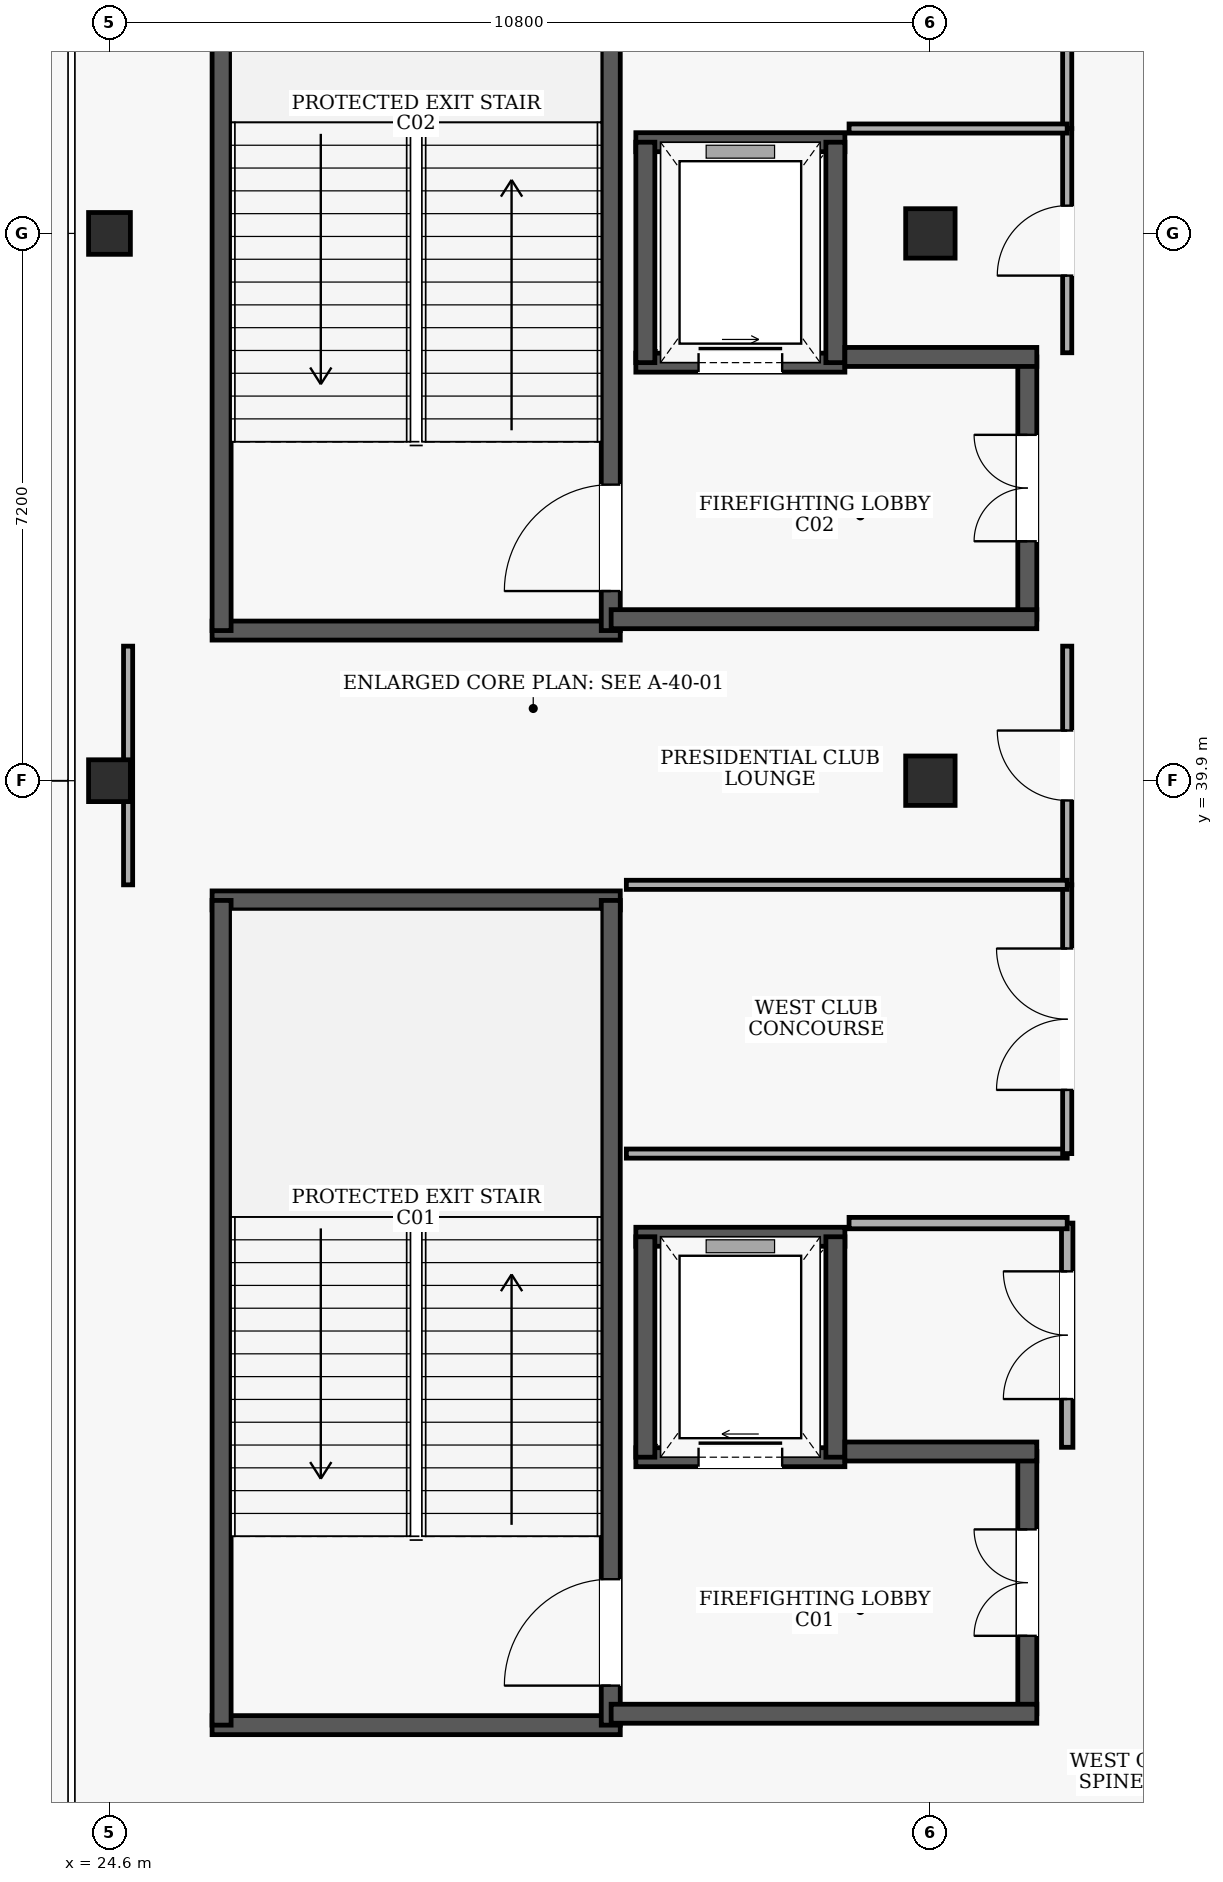
"""IFC4 building model, lengths in metres.
Left out: names, types, materials, properties, quantities, classifications, styles, units other than length and angle.
Written with IfcOpenShell. Run it as: python <this file> out.ifc"""

import sys

from ifc_helpers import new_model, si_unit, direction, frame, frame_2d, origin, origin_2d, place, context, subcontext, project, spatial, rectangle, extrude, element, fill, save


model = new_model("IFC4")
c1 = context("Model", 3, precision=1e-05, world=origin(), true_north=direction((0.0, 1.0)))
c2 = subcontext(c1, "Body", "Model", "MODEL_VIEW")
j1 = project(units=[si_unit("LENGTHUNIT", "METRE"), si_unit("PLANEANGLEUNIT", "RADIAN")], contexts=[c1])
p1 = place(None, origin())
s1 = spatial("IfcSite", under=j1, at=p1, CompositionType="ELEMENT")
p2 = place(p1, origin())
s2 = spatial("IfcBuilding", under=s1, at=p2, CompositionType="ELEMENT")
p3 = place(p2, frame((0.0, 0.0, 10.2)))
s3 = spatial("IfcBuildingStorey", under=s2, at=p3, CompositionType="ELEMENT", Elevation=10.2)
for number, where, z_axis, x_axis in (
    (1, (24.6, 39.9, 0.0), (0.0, 0.0, 1.0), (1.0, 0.0, 0.0)),
    (2, (24.6, 47.1, 0.0), (0.0, 0.0, 1.0), (1.0, 0.0, 0.0)),
):
    element("IfcColumn", number, at=place(p3, frame(where, z_axis=z_axis, x_axis=x_axis)), inside=s3, PredefinedType="COLUMN", context=c2, shape_type="SweptSolid", body=[
        extrude(rectangle(XDim=0.55, YDim=0.55, at=origin_2d()), origin(), (0.0, 0.0, 1.0), 4.8),
    ])
for number, where, z_axis, x_axis in (
    (3, (35.4, 39.9, 0.0), (0.0, 0.0, 1.0), (1.0, 0.0, 0.0)),
    (4, (35.4, 47.1, 0.0), (0.0, 0.0, 1.0), (1.0, 0.0, 0.0)),
):
    element("IfcColumn", number, at=place(p3, frame(where, z_axis=z_axis, x_axis=x_axis)), inside=s3, PredefinedType="COLUMN", context=c2, shape_type="SweptSolid", body=[
        extrude(rectangle(XDim=0.65, YDim=0.65, at=origin_2d()), origin(), (0.0, 0.0, 1.0), 4.8),
    ])
for number, where, z_axis, x_axis in (
    (5, (25.95, 27.475, 0.0), (0.0, 0.0, 1.0), (1.0, 0.0, 0.0)),
    (6, (31.32, 38.325, 0.0), (0.0, 0.0, 1.0), (-1.0, 0.0, 0.0)),
):
    element("IfcWall", number, at=place(p3, frame(where, z_axis=z_axis, x_axis=x_axis)), inside=s3, PredefinedType="SHEAR", context=c2, shape_type="SweptSolid", body=[
        extrude(rectangle(XDim=5.37, YDim=0.25, at=frame_2d((2.685, 0.0))), origin(), (0.0, 0.0, 1.0), 4.48),
    ])
p4 = place(p3, frame((26.075, 27.475, 0.0), z_axis=(0.0, 0.0, 1.0), x_axis=(0.0, 1.0, 0.0)))
e7 = element("IfcWall", 7, at=p4, inside=s3, PredefinedType="SHEAR", context=c2, shape_type="SweptSolid", body=[
    extrude(rectangle(XDim=10.85, YDim=0.25, at=frame_2d((5.425, 0.0))), origin(), (0.0, 0.0, 1.0), 4.48),
])
p5 = place(p3, frame((31.195, 27.475, 0.0), z_axis=(0.0, 0.0, 1.0), x_axis=(0.0, 1.0, 0.0)))
e8 = element("IfcWall", 8, at=p5, inside=s3, PredefinedType="SHEAR", context=c2, shape_type="SweptSolid", body=[
    extrude(rectangle(XDim=10.85, YDim=0.25, at=frame_2d((5.425, 0.0))), origin(), (0.0, 0.0, 1.0), 4.48),
])
p6 = place(p5, frame((0.52, 0.0, 0.0)))
e9 = element("IfcOpeningElement", 9, at=p6, cuts=e8, PredefinedType="OPENING", context=c2, shape_type="SweptSolid", body=[
    extrude(rectangle(XDim=1.4, YDim=2.15, at=frame_2d((0.7, 1.075))), frame((0.0, 0.135, 0.0), z_axis=(0.0, -1.0, 0.0), x_axis=(1.0, 0.0, 0.0)), (0.0, 0.0, 1.0), 0.27),
])
p7 = place(p3, frame((25.95, 41.875, 0.0), z_axis=(0.0, 0.0, 1.0), x_axis=(1.0, 0.0, 0.0)))
e10 = element("IfcWall", 10, at=p7, inside=s3, PredefinedType="SHEAR", context=c2, shape_type="SweptSolid", body=[
    extrude(rectangle(XDim=5.37, YDim=0.25, at=frame_2d((2.685, 0.0))), origin(), (0.0, 0.0, 1.0), 4.48),
])
p8 = place(p3, frame((26.075, 41.875, 0.0), z_axis=(0.0, 0.0, 1.0), x_axis=(0.0, 1.0, 0.0)))
e11 = element("IfcWall", 11, at=p8, inside=s3, PredefinedType="SHEAR", context=c2, shape_type="SweptSolid", body=[
    extrude(rectangle(XDim=10.85, YDim=0.25, at=frame_2d((5.425, 0.0))), origin(), (0.0, 0.0, 1.0), 4.48),
])
p9 = place(p3, frame((31.195, 41.875, 0.0), z_axis=(0.0, 0.0, 1.0), x_axis=(0.0, 1.0, 0.0)))
e12 = element("IfcWall", 12, at=p9, inside=s3, PredefinedType="SHEAR", context=c2, shape_type="SweptSolid", body=[
    extrude(rectangle(XDim=10.85, YDim=0.25, at=frame_2d((5.425, 0.0))), origin(), (0.0, 0.0, 1.0), 4.48),
])
p10 = place(p9, frame((0.52, 0.0, 0.0)))
e13 = element("IfcOpeningElement", 13, at=p10, cuts=e12, PredefinedType="OPENING", context=c2, shape_type="SweptSolid", body=[
    extrude(rectangle(XDim=1.4, YDim=2.15, at=frame_2d((0.7, 1.075))), frame((0.0, 0.135, 0.0), z_axis=(0.0, -1.0, 0.0), x_axis=(1.0, 0.0, 0.0)), (0.0, 0.0, 1.0), 0.27),
])
p11 = place(p3, frame((31.525, 31.0, 0.0), z_axis=(0.0, 0.0, 1.0), x_axis=(1.0, 0.0, 0.0)))
e14 = element("IfcWall", 14, at=p11, inside=s3, PredefinedType="SHEAR", context=c2, shape_type="SweptSolid", body=[
    extrude(rectangle(XDim=2.75, YDim=0.25, at=frame_2d((1.375, 0.0))), origin(), (0.0, 0.0, 1.0), 4.48),
])
p12 = place(p11, frame((0.825, 0.0, 0.0)))
e15 = element("IfcOpeningElement", 15, at=p12, cuts=e14, PredefinedType="OPENING", context=c2, shape_type="SweptSolid", body=[
    extrude(rectangle(XDim=1.1, YDim=2.15, at=frame_2d((0.55, 1.075))), frame((0.0, 0.135, 0.0), z_axis=(0.0, -1.0, 0.0), x_axis=(1.0, 0.0, 0.0)), (0.0, 0.0, 1.0), 0.27),
])
p13 = place(p3, frame((34.275, 33.9, 0.0), z_axis=(0.0, 0.0, 1.0), x_axis=(-1.0, 0.0, 0.0)))
e16 = element("IfcWall", 16, at=p13, inside=s3, PredefinedType="SHEAR", context=c2, shape_type="SweptSolid", body=[
    extrude(rectangle(XDim=2.75, YDim=0.25, at=frame_2d((1.375, 0.0))), origin(), (0.0, 0.0, 1.0), 4.48),
])
for number, where, z_axis, x_axis in (
    (17, (31.65, 33.9, 0.0), (0.0, 0.0, 1.0), (0.0, -1.0, 0.0)),
    (18, (34.15, 31.0, 0.0), (0.0, 0.0, 1.0), (0.0, 1.0, 0.0)),
):
    element("IfcWall", number, at=place(p3, frame(where, z_axis=z_axis, x_axis=x_axis)), inside=s3, PredefinedType="SHEAR", context=c2, shape_type="SweptSolid", body=[
        extrude(rectangle(XDim=2.9, YDim=0.25, at=frame_2d((1.45, 0.0))), origin(), (0.0, 0.0, 1.0), 4.48),
    ])
p14 = place(p3, frame((36.675, 27.625, 0.0), z_axis=(0.0, 0.0, 1.0), x_axis=(0.0, 1.0, 0.0)))
e19 = element("IfcWall", 19, at=p14, inside=s3, PredefinedType="SHEAR", context=c2, shape_type="SweptSolid", body=[
    extrude(rectangle(XDim=3.45, YDim=0.25, at=frame_2d((1.725, 0.0))), origin(), (0.0, 0.0, 1.0), 4.48),
])
p15 = place(p14, frame((1.025, 0.0, 0.0)))
e20 = element("IfcOpeningElement", 20, at=p15, cuts=e19, PredefinedType="OPENING", context=c2, shape_type="SweptSolid", body=[
    extrude(rectangle(XDim=1.4, YDim=2.15, at=frame_2d((0.7, 1.075))), frame((0.0, 0.135, 0.0), z_axis=(0.0, -1.0, 0.0), x_axis=(1.0, 0.0, 0.0)), (0.0, 0.0, 1.0), 0.27),
])
p16 = place(p3, frame((34.275, 31.075, 0.0), z_axis=(0.0, 0.0, 1.0), x_axis=(1.0, 0.0, 0.0)))
e21 = element("IfcWall", 21, at=p16, inside=s3, PredefinedType="SHEAR", context=c2, shape_type="SweptSolid", body=[
    extrude(rectangle(XDim=2.525, YDim=0.25, at=frame_2d((1.263, 0.0))), origin(), (0.0, 0.0, 1.0), 4.48),
])
p17 = place(p3, frame((31.2, 27.625, 0.0), z_axis=(0.0, 0.0, 1.0), x_axis=(1.0, 0.0, 0.0)))
e22 = element("IfcWall", 22, at=p17, inside=s3, PredefinedType="SHEAR", context=c2, shape_type="SweptSolid", body=[
    extrude(rectangle(XDim=5.6, YDim=0.25, at=frame_2d((2.8, 0.0))), origin(), (0.0, 0.0, 1.0), 4.48),
])
p18 = place(p3, frame((31.525, 45.4, 0.0), z_axis=(0.0, 0.0, 1.0), x_axis=(1.0, 0.0, 0.0)))
e23 = element("IfcWall", 23, at=p18, inside=s3, PredefinedType="SHEAR", context=c2, shape_type="SweptSolid", body=[
    extrude(rectangle(XDim=2.75, YDim=0.25, at=frame_2d((1.375, 0.0))), origin(), (0.0, 0.0, 1.0), 4.48),
])
p19 = place(p18, frame((0.825, 0.0, 0.0)))
e24 = element("IfcOpeningElement", 24, at=p19, cuts=e23, PredefinedType="OPENING", context=c2, shape_type="SweptSolid", body=[
    extrude(rectangle(XDim=1.1, YDim=2.15, at=frame_2d((0.55, 1.075))), frame((0.0, 0.135, 0.0), z_axis=(0.0, -1.0, 0.0), x_axis=(1.0, 0.0, 0.0)), (0.0, 0.0, 1.0), 0.27),
])
p20 = place(p3, frame((34.275, 48.3, 0.0), z_axis=(0.0, 0.0, 1.0), x_axis=(-1.0, 0.0, 0.0)))
e25 = element("IfcWall", 25, at=p20, inside=s3, PredefinedType="SHEAR", context=c2, shape_type="SweptSolid", body=[
    extrude(rectangle(XDim=2.75, YDim=0.25, at=frame_2d((1.375, 0.0))), origin(), (0.0, 0.0, 1.0), 4.48),
])
for number, where, z_axis, x_axis in (
    (26, (31.65, 48.3, 0.0), (0.0, 0.0, 1.0), (0.0, -1.0, 0.0)),
    (27, (34.15, 45.4, 0.0), (0.0, 0.0, 1.0), (0.0, 1.0, 0.0)),
):
    element("IfcWall", number, at=place(p3, frame(where, z_axis=z_axis, x_axis=x_axis)), inside=s3, PredefinedType="SHEAR", context=c2, shape_type="SweptSolid", body=[
        extrude(rectangle(XDim=2.9, YDim=0.25, at=frame_2d((1.45, 0.0))), origin(), (0.0, 0.0, 1.0), 4.48),
    ])
p21 = place(p3, frame((36.675, 42.025, 0.0), z_axis=(0.0, 0.0, 1.0), x_axis=(0.0, 1.0, 0.0)))
e28 = element("IfcWall", 28, at=p21, inside=s3, PredefinedType="SHEAR", context=c2, shape_type="SweptSolid", body=[
    extrude(rectangle(XDim=3.45, YDim=0.25, at=frame_2d((1.725, 0.0))), origin(), (0.0, 0.0, 1.0), 4.48),
])
p22 = place(p21, frame((1.025, 0.0, 0.0)))
e29 = element("IfcOpeningElement", 29, at=p22, cuts=e28, PredefinedType="OPENING", context=c2, shape_type="SweptSolid", body=[
    extrude(rectangle(XDim=1.4, YDim=2.15, at=frame_2d((0.7, 1.075))), frame((0.0, 0.135, 0.0), z_axis=(0.0, -1.0, 0.0), x_axis=(1.0, 0.0, 0.0)), (0.0, 0.0, 1.0), 0.27),
])
p23 = place(p3, frame((34.275, 45.475, 0.0), z_axis=(0.0, 0.0, 1.0), x_axis=(1.0, 0.0, 0.0)))
e30 = element("IfcWall", 30, at=p23, inside=s3, PredefinedType="SHEAR", context=c2, shape_type="SweptSolid", body=[
    extrude(rectangle(XDim=2.525, YDim=0.25, at=frame_2d((1.263, 0.0))), origin(), (0.0, 0.0, 1.0), 4.48),
])
p24 = place(p3, frame((31.2, 42.025, 0.0), z_axis=(0.0, 0.0, 1.0), x_axis=(1.0, 0.0, 0.0)))
e31 = element("IfcWall", 31, at=p24, inside=s3, PredefinedType="SHEAR", context=c2, shape_type="SweptSolid", body=[
    extrude(rectangle(XDim=5.6, YDim=0.25, at=frame_2d((2.8, 0.0))), origin(), (0.0, 0.0, 1.0), 4.48),
])
p25 = place(p3, frame((37.2, 31.13, 0.0), z_axis=(0.0, 0.0, 1.0), x_axis=(0.0, 1.0, 0.0)))
e32 = element("IfcWall", 32, at=p25, inside=s3, PredefinedType="PARTITIONING", context=c2, shape_type="SweptSolid", body=[
    extrude(rectangle(XDim=2.95, YDim=0.15, at=frame_2d((1.475, 0.0))), origin(), (0.0, 0.0, 1.0), 4.48),
])
p26 = place(p25, frame((0.635, 0.0, 0.0)))
e33 = element("IfcOpeningElement", 33, at=p26, cuts=e32, PredefinedType="OPENING", context=c2, shape_type="SweptSolid", body=[
    extrude(rectangle(XDim=1.68, YDim=2.25, at=frame_2d((0.84, 1.125))), frame((0.0, 0.085, 0.0), z_axis=(0.0, -1.0, 0.0), x_axis=(1.0, 0.0, 0.0)), (0.0, 0.0, 1.0), 0.17),
])
p27 = place(p3, frame((37.2, 34.08, 0.0), z_axis=(0.0, 0.0, 1.0), x_axis=(-1.0, 0.0, 0.0)))
e34 = element("IfcWall", 34, at=p27, inside=s3, PredefinedType="PARTITIONING", context=c2, shape_type="SweptSolid", body=[
    extrude(rectangle(XDim=2.87, YDim=0.15, at=frame_2d((1.435, 0.0))), origin(), (0.0, 0.0, 1.0), 4.48),
])
p28 = place(p3, frame((37.2, 38.53, 0.0), z_axis=(0.0, 0.0, 1.0), x_axis=(0.0, 1.0, 0.0)))
e35 = element("IfcWall", 35, at=p28, inside=s3, PredefinedType="PARTITIONING", context=c2, shape_type="SweptSolid", body=[
    extrude(rectangle(XDim=3.14, YDim=0.12, at=frame_2d((1.57, 0.0))), origin(), (0.0, 0.0, 1.0), 4.48),
])
p29 = place(p28, frame((1.11, 0.0, 0.0)))
e36 = element("IfcOpeningElement", 36, at=p29, cuts=e35, PredefinedType="OPENING", context=c2, shape_type="SweptSolid", body=[
    extrude(rectangle(XDim=0.92, YDim=2.1, at=frame_2d((0.46, 1.05))), frame((0.0, 0.07, 0.0), z_axis=(0.0, -1.0, 0.0), x_axis=(1.0, 0.0, 0.0)), (0.0, 0.0, 1.0), 0.14),
])
p30 = place(p3, frame((24.845, 41.67, 0.0), z_axis=(0.0, 0.0, 1.0), x_axis=(0.0, -1.0, 0.0)))
e37 = element("IfcWall", 37, at=p30, inside=s3, PredefinedType="PARTITIONING", context=c2, shape_type="SweptSolid", body=[
    extrude(rectangle(XDim=3.14, YDim=0.12, at=frame_2d((1.57, 0.0))), origin(), (0.0, 0.0, 1.0), 3.56),
])
p31 = place(p3, frame((31.4, 34.994, 0.0), z_axis=(0.0, 0.0, 1.0), x_axis=(1.0, 0.0, 0.0)))
e38 = element("IfcWall", 38, at=p31, inside=s3, PredefinedType="PARTITIONING", context=c2, shape_type="SweptSolid", body=[
    extrude(rectangle(XDim=5.8, YDim=0.12, at=frame_2d((2.9, 0.0))), origin(), (0.0, 0.0, 1.0), 4.48),
])
p32 = place(p3, frame((37.2, 34.994, 0.0), z_axis=(0.0, 0.0, 1.0), x_axis=(0.0, 1.0, 0.0)))
e39 = element("IfcWall", 39, at=p32, inside=s3, PredefinedType="PARTITIONING", context=c2, shape_type="SweptSolid", body=[
    extrude(rectangle(XDim=3.536, YDim=0.12, at=frame_2d((1.768, 0.0))), origin(), (0.0, 0.0, 1.0), 4.48),
])
p33 = place(p32, frame((0.838, 0.0, 0.0)))
e40 = element("IfcOpeningElement", 40, at=p33, cuts=e39, PredefinedType="OPENING", context=c2, shape_type="SweptSolid", body=[
    extrude(rectangle(XDim=1.86, YDim=2.3, at=frame_2d((0.93, 1.15))), frame((0.0, 0.07, 0.0), z_axis=(0.0, -1.0, 0.0), x_axis=(1.0, 0.0, 0.0)), (0.0, 0.0, 1.0), 0.14),
])
p34 = place(p3, frame((37.2, 38.53, 0.0), z_axis=(0.0, 0.0, 1.0), x_axis=(-1.0, 0.0, 0.0)))
e41 = element("IfcWall", 41, at=p34, inside=s3, PredefinedType="PARTITIONING", context=c2, shape_type="SweptSolid", body=[
    extrude(rectangle(XDim=5.8, YDim=0.12, at=frame_2d((2.9, 0.0))), origin(), (0.0, 0.0, 1.0), 4.48),
])
p35 = place(p3, frame((37.2, 48.48, 0.0), z_axis=(0.0, 0.0, 1.0), x_axis=(0.0, 1.0, 0.0)))
e42 = element("IfcWall", 42, at=p35, inside=s3, PredefinedType="PARTITIONING", context=c2, shape_type="SweptSolid", body=[
    extrude(rectangle(XDim=4.45, YDim=0.12, at=frame_2d((2.225, 0.0))), origin(), (0.0, 0.0, 1.0), 4.48),
])
p36 = place(p35, frame((1.245, 0.0, 0.0)))
e43 = element("IfcOpeningElement", 43, at=p36, cuts=e42, PredefinedType="OPENING", context=c2, shape_type="SweptSolid", body=[
    extrude(rectangle(XDim=1.96, YDim=2.3, at=frame_2d((0.98, 1.15))), frame((0.0, 0.07, 0.0), z_axis=(0.0, -1.0, 0.0), x_axis=(1.0, 0.0, 0.0)), (0.0, 0.0, 1.0), 0.14),
])
p37 = place(p3, frame((37.2, 45.53, 0.0), z_axis=(0.0, 0.0, 1.0), x_axis=(0.0, 1.0, 0.0)))
e44 = element("IfcWall", 44, at=p37, inside=s3, PredefinedType="PARTITIONING", context=c2, shape_type="SweptSolid", body=[
    extrude(rectangle(XDim=2.95, YDim=0.12, at=frame_2d((1.475, 0.0))), origin(), (0.0, 0.0, 1.0), 4.48),
])
p38 = place(p37, frame((1.015, 0.0, 0.0)))
e45 = element("IfcOpeningElement", 45, at=p38, cuts=e44, PredefinedType="OPENING", context=c2, shape_type="SweptSolid", body=[
    extrude(rectangle(XDim=0.92, YDim=2.1, at=frame_2d((0.46, 1.05))), frame((0.0, 0.07, 0.0), z_axis=(0.0, -1.0, 0.0), x_axis=(1.0, 0.0, 0.0)), (0.0, 0.0, 1.0), 0.14),
])
p39 = place(p3, frame((37.2, 48.48, 0.0), z_axis=(0.0, 0.0, 1.0), x_axis=(-1.0, 0.0, 0.0)))
e46 = element("IfcWall", 46, at=p39, inside=s3, PredefinedType="PARTITIONING", context=c2, shape_type="SweptSolid", body=[
    extrude(rectangle(XDim=2.87, YDim=0.12, at=frame_2d((1.435, 0.0))), origin(), (0.0, 0.0, 1.0), 4.48),
])
p40 = place(p6, origin())
e47 = element("IfcDoor", 47, at=p40, inside=s3, OperationType="SINGLE_SWING_LEFT", PredefinedType="DOOR", context=c2, shape_type="SweptSolid", body=[
    extrude(rectangle(XDim=1.4, YDim=2.15, at=frame_2d((0.7, 1.075))), frame((0.0, 0.025, 0.0), z_axis=(0.0, -1.0, 0.0), x_axis=(1.0, 0.0, 0.0)), (0.0, 0.0, 1.0), 0.05),
])
fill(e9, e47)
p41 = place(p10, origin())
e48 = element("IfcDoor", 48, at=p41, inside=s3, OperationType="SINGLE_SWING_LEFT", PredefinedType="DOOR", context=c2, shape_type="SweptSolid", body=[
    extrude(rectangle(XDim=1.4, YDim=2.15, at=frame_2d((0.7, 1.075))), frame((0.0, 0.025, 0.0), z_axis=(0.0, -1.0, 0.0), x_axis=(1.0, 0.0, 0.0)), (0.0, 0.0, 1.0), 0.05),
])
fill(e13, e48)
p42 = place(p12, origin())
e49 = element("IfcDoor", 49, at=p42, inside=s3, OperationType="SLIDING_TO_RIGHT", PredefinedType="DOOR", context=c2, shape_type="SweptSolid", body=[
    extrude(rectangle(XDim=1.1, YDim=2.15, at=frame_2d((0.55, 1.075))), frame((0.0, 0.025, 0.0), z_axis=(0.0, -1.0, 0.0), x_axis=(1.0, 0.0, 0.0)), (0.0, 0.0, 1.0), 0.05),
])
fill(e15, e49)
p43 = place(p15, origin())
e50 = element("IfcDoor", 50, at=p43, inside=s3, OperationType="DOUBLE_DOOR_SINGLE_SWING", PredefinedType="DOOR", context=c2, shape_type="SweptSolid", body=[
    extrude(rectangle(XDim=1.4, YDim=2.15, at=frame_2d((0.7, 1.075))), frame((0.0, 0.025, 0.0), z_axis=(0.0, -1.0, 0.0), x_axis=(1.0, 0.0, 0.0)), (0.0, 0.0, 1.0), 0.05),
])
fill(e20, e50)
p44 = place(p19, origin())
e51 = element("IfcDoor", 51, at=p44, inside=s3, OperationType="SLIDING_TO_LEFT", PredefinedType="DOOR", context=c2, shape_type="SweptSolid", body=[
    extrude(rectangle(XDim=1.1, YDim=2.15, at=frame_2d((0.55, 1.075))), frame((0.0, 0.025, 0.0), z_axis=(0.0, -1.0, 0.0), x_axis=(1.0, 0.0, 0.0)), (0.0, 0.0, 1.0), 0.05),
])
fill(e24, e51)
p45 = place(p22, origin())
e52 = element("IfcDoor", 52, at=p45, inside=s3, OperationType="DOUBLE_DOOR_SINGLE_SWING", PredefinedType="DOOR", context=c2, shape_type="SweptSolid", body=[
    extrude(rectangle(XDim=1.4, YDim=2.15, at=frame_2d((0.7, 1.075))), frame((0.0, 0.025, 0.0), z_axis=(0.0, -1.0, 0.0), x_axis=(1.0, 0.0, 0.0)), (0.0, 0.0, 1.0), 0.05),
])
fill(e29, e52)
p46 = place(p26, origin())
e53 = element("IfcDoor", 53, at=p46, inside=s3, OperationType="DOUBLE_DOOR_SINGLE_SWING", PredefinedType="DOOR", context=c2, shape_type="SweptSolid", body=[
    extrude(rectangle(XDim=1.68, YDim=2.25, at=frame_2d((0.84, 1.125))), frame((0.0, 0.025, 0.0), z_axis=(0.0, -1.0, 0.0), x_axis=(1.0, 0.0, 0.0)), (0.0, 0.0, 1.0), 0.05),
])
fill(e33, e53)
p47 = place(p29, origin())
e54 = element("IfcDoor", 54, at=p47, inside=s3, OperationType="SINGLE_SWING_RIGHT", PredefinedType="DOOR", context=c2, shape_type="SweptSolid", body=[
    extrude(rectangle(XDim=0.92, YDim=2.1, at=frame_2d((0.46, 1.05))), frame((0.0, 0.025, 0.0), z_axis=(0.0, -1.0, 0.0), x_axis=(1.0, 0.0, 0.0)), (0.0, 0.0, 1.0), 0.05),
])
fill(e36, e54)
p48 = place(p33, origin())
e55 = element("IfcDoor", 55, at=p48, inside=s3, OperationType="DOUBLE_DOOR_SINGLE_SWING", PredefinedType="DOOR", context=c2, shape_type="SweptSolid", body=[
    extrude(rectangle(XDim=1.86, YDim=2.3, at=frame_2d((0.93, 1.15))), frame((0.0, 0.025, 0.0), z_axis=(0.0, -1.0, 0.0), x_axis=(1.0, 0.0, 0.0)), (0.0, 0.0, 1.0), 0.05),
])
fill(e40, e55)
p49 = place(p38, origin())
e56 = element("IfcDoor", 56, at=p49, inside=s3, OperationType="SINGLE_SWING_LEFT", PredefinedType="DOOR", context=c2, shape_type="SweptSolid", body=[
    extrude(rectangle(XDim=0.92, YDim=2.1, at=frame_2d((0.46, 1.05))), frame((0.0, 0.025, 0.0), z_axis=(0.0, -1.0, 0.0), x_axis=(1.0, 0.0, 0.0)), (0.0, 0.0, 1.0), 0.05),
])
fill(e45, e56)
save(model, sys.argv[1])
